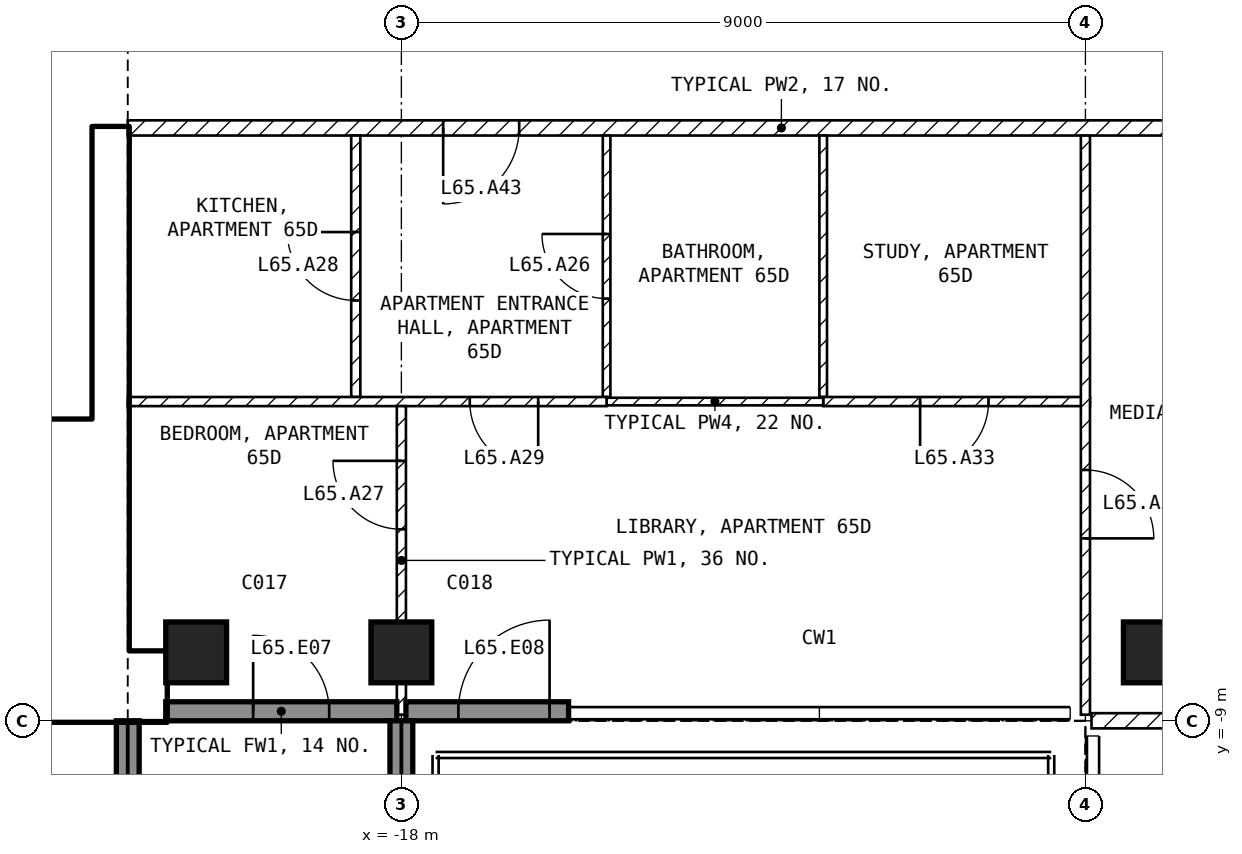
"""IFC4 building model, lengths in metres.
Left out: names, types, materials, properties, quantities, classifications, styles, units other than length and angle.
Written with IfcOpenShell. Run it as: python <this file> out.ifc"""

import sys

from ifc_helpers import new_model, si_unit, direction, frame, frame_2d, origin, origin_2d, place, context, subcontext, project, spatial, rectangle, extrude, element, fill, save


model = new_model("IFC4")
c1 = context("Model", 3, precision=1e-05, world=origin(), true_north=direction((0.0, 1.0)))
c2 = subcontext(c1, "Body", "Model", "MODEL_VIEW")
j1 = project(units=[si_unit("LENGTHUNIT", "METRE"), si_unit("PLANEANGLEUNIT", "RADIAN")], contexts=[c1])
p1 = place(None, origin())
s1 = spatial("IfcSite", under=j1, at=p1, CompositionType="ELEMENT")
p2 = place(p1, origin())
s2 = spatial("IfcBuilding", under=s1, at=p2, CompositionType="ELEMENT")
p3 = place(p2, frame((0.0, 0.0, 257.0)))
s3 = spatial("IfcBuildingStorey", under=s2, at=p3, CompositionType="ELEMENT", Elevation=257.0)
for number, where, z_axis, x_axis in (
    (1, (-20.7, -8.1, -0.25), (0.0, 0.0, 1.0), (1.0, 0.0, 0.0)),
    (2, (-18.0, -8.1, -0.25), (0.0, 0.0, 1.0), (1.0, 0.0, 0.0)),
    (3, (-8.1, -8.1, -0.25), (0.0, 0.0, 1.0), (1.0, 0.0, 0.0)),
):
    element("IfcColumn", number, at=place(p3, frame(where, z_axis=z_axis, x_axis=x_axis)), inside=s3, PredefinedType="COLUMN", context=c2, shape_type="SweptSolid", body=[
        extrude(rectangle(XDim=0.8, YDim=0.8, at=origin_2d()), origin(), (0.0, 0.0, 1.0), 3.5),
    ])
p4 = place(p3, frame((-21.1, -8.875, 0.0), z_axis=(0.0, 0.0, 1.0), x_axis=(1.0, 0.0, 0.0)))
e4 = element("IfcWall", 4, at=p4, inside=s3, PredefinedType="SOLIDWALL", context=c2, shape_type="SweptSolid", body=[
    extrude(rectangle(XDim=3.04, YDim=0.25, at=frame_2d((1.52, 0.0))), origin(), (0.0, 0.0, 1.0), 3.25),
])
p5 = place(p4, frame((1.15, 0.0, 0.0)))
e5 = element("IfcOpeningElement", 5, at=p5, cuts=e4, PredefinedType="OPENING", context=c2, shape_type="SweptSolid", body=[
    extrude(rectangle(XDim=1.0, YDim=2.4, at=frame_2d((0.5, 1.2))), frame((0.0, 0.135, 0.0), z_axis=(0.0, -1.0, 0.0), x_axis=(1.0, 0.0, 0.0)), (0.0, 0.0, 1.0), 0.27),
])
p6 = place(p3, frame((-17.94, -8.875, 0.0), z_axis=(0.0, 0.0, 1.0), x_axis=(1.0, 0.0, 0.0)))
e6 = element("IfcWall", 6, at=p6, inside=s3, PredefinedType="SOLIDWALL", context=c2, shape_type="SweptSolid", body=[
    extrude(rectangle(XDim=2.14, YDim=0.25, at=frame_2d((1.07, 0.0))), origin(), (0.0, 0.0, 1.0), 3.25),
])
p7 = place(p6, frame((0.69, 0.0, 0.0)))
e7 = element("IfcOpeningElement", 7, at=p7, cuts=e6, PredefinedType="OPENING", context=c2, shape_type="SweptSolid", body=[
    extrude(rectangle(XDim=1.2, YDim=2.4, at=frame_2d((0.6, 1.2))), frame((0.0, 0.135, 0.0), z_axis=(0.0, -1.0, 0.0), x_axis=(1.0, 0.0, 0.0)), (0.0, 0.0, 1.0), 0.27),
])
p8 = place(p3, frame((-21.6, -9.0, 0.0), z_axis=(0.0, 0.0, 1.0), x_axis=(0.0, -1.0, 0.0)))
e8 = element("IfcWall", 8, at=p8, inside=s3, PredefinedType="SOLIDWALL", context=c2, shape_type="SweptSolid", body=[
    extrude(rectangle(XDim=2.7, YDim=0.3, at=frame_2d((1.35, 0.0))), origin(), (0.0, 0.0, 1.0), 3.25),
])
p9 = place(p3, frame((-18.0, -9.0, 0.0), z_axis=(0.0, 0.0, 1.0), x_axis=(0.0, -1.0, 0.0)))
e9 = element("IfcWall", 9, at=p9, inside=s3, PredefinedType="SOLIDWALL", context=c2, shape_type="SweptSolid", body=[
    extrude(rectangle(XDim=2.74, YDim=0.3, at=frame_2d((1.37, 0.0))), origin(), (0.0, 0.0, 1.0), 3.25),
])
p10 = place(p3, frame((-30.2, -8.55, 0.0), z_axis=(0.0, 0.0, 1.0), x_axis=(1.0, 0.0, 0.0)))
e10 = element("IfcWall", 10, at=p10, inside=s3, PredefinedType="SHEAR", context=c2, shape_type="SweptSolid", body=[
    extrude(rectangle(XDim=9.1, YDim=0.9, at=frame_2d((4.55, 0.0))), origin(), (0.0, 0.0, 1.0), 3.25),
])
p11 = place(p3, frame((-21.825, -8.1, 0.0), z_axis=(0.0, 0.0, 1.0), x_axis=(0.0, 1.0, 0.0)))
e11 = element("IfcWall", 11, at=p11, inside=s3, PredefinedType="SHEAR", context=c2, shape_type="SweptSolid", body=[
    extrude(rectangle(XDim=6.9, YDim=0.45, at=frame_2d((3.45, 0.0))), origin(), (0.0, 0.0, 1.0), 3.25),
])
p12 = place(p3, frame((-28.35, -5.15, 0.0), z_axis=(0.0, 0.0, 1.0), x_axis=(1.0, 0.0, 0.0)))
e12 = element("IfcWall", 12, at=p12, inside=s3, PredefinedType="SOLIDWALL", context=c2, shape_type="SweptSolid", body=[
    extrude(rectangle(XDim=6.3, YDim=0.2, at=frame_2d((3.15, 0.0))), origin(), (0.0, 0.0, 1.0), 3.25),
])
p13 = place(p12, frame((5.1, 0.0, 0.0)))
e13 = element("IfcOpeningElement", 13, at=p13, cuts=e12, PredefinedType="OPENING", context=c2, shape_type="SweptSolid", body=[
    extrude(rectangle(XDim=1.0, YDim=2.1, at=frame_2d((0.5, 1.05))), frame((0.0, 0.11, 0.0), z_axis=(0.0, -1.0, 0.0), x_axis=(1.0, 0.0, 0.0)), (0.0, 0.0, 1.0), 0.22),
])
p14 = place(p3, frame((-4.4, -1.2, 0.0), z_axis=(0.0, 0.0, 1.0), x_axis=(-1.0, 0.0, 0.0)))
e14 = element("IfcWall", 14, at=p14, inside=s3, PredefinedType="PARTITIONING", context=c2, shape_type="SweptSolid", body=[
    extrude(rectangle(XDim=17.2, YDim=0.2, at=frame_2d((8.6, 0.0))), origin(), (0.0, 0.0, 1.0), 3.25),
])
p15 = place(p14, frame((12.05, 0.0, 0.0)))
e15 = element("IfcOpeningElement", 15, at=p15, cuts=e14, PredefinedType="OPENING", context=c2, shape_type="SweptSolid", body=[
    extrude(rectangle(XDim=1.0, YDim=2.1, at=frame_2d((0.5, 1.05))), frame((0.0, 0.11, 0.0), z_axis=(0.0, -1.0, 0.0), x_axis=(1.0, 0.0, 0.0)), (0.0, 0.0, 1.0), 0.22),
])
p16 = place(p3, frame((8.92, -9.0, 0.0), z_axis=(0.0, 0.0, 1.0), x_axis=(-1.0, 0.0, 0.0)))
e16 = element("IfcWall", 16, at=p16, inside=s3, PredefinedType="PARTITIONING", context=c2, shape_type="SweptSolid", body=[
    extrude(rectangle(XDim=17.84, YDim=0.2, at=frame_2d((8.92, 0.0))), origin(), (0.0, 0.0, 1.0), 3.25),
])
p17 = place(p16, frame((8.42, 0.0, 0.0)))
e17 = element("IfcOpeningElement", 17, at=p17, cuts=e16, PredefinedType="OPENING", context=c2, shape_type="SweptSolid", body=[
    extrude(rectangle(XDim=1.0, YDim=2.1, at=frame_2d((0.5, 1.05))), frame((0.0, 0.11, 0.0), z_axis=(0.0, -1.0, 0.0), x_axis=(1.0, 0.0, 0.0)), (0.0, 0.0, 1.0), 0.22),
])
p18 = place(p3, frame((-12.45, -4.74, 0.0), z_axis=(0.0, 0.0, 1.0), x_axis=(0.0, 1.0, 0.0)))
e18 = element("IfcWall", 18, at=p18, inside=s3, PredefinedType="PARTITIONING", context=c2, shape_type="SweptSolid", body=[
    extrude(rectangle(XDim=3.44, YDim=0.1, at=frame_2d((1.72, 0.0))), origin(), (0.0, 0.0, 1.0), 3.25),
])
p19 = place(p3, frame((-8.94, -4.8, 0.0), z_axis=(0.0, 0.0, 1.0), x_axis=(-1.0, 0.0, 0.0)))
e19 = element("IfcWall", 19, at=p19, inside=s3, PredefinedType="PARTITIONING", context=c2, shape_type="SweptSolid", body=[
    extrude(rectangle(XDim=3.51, YDim=0.12, at=frame_2d((1.755, 0.0))), origin(), (0.0, 0.0, 1.0), 3.25),
])
p20 = place(p19, frame((1.335, 0.0, 0.0)))
e20 = element("IfcOpeningElement", 20, at=p20, cuts=e19, PredefinedType="OPENING", context=c2, shape_type="SweptSolid", body=[
    extrude(rectangle(XDim=0.9, YDim=2.1, at=frame_2d((0.45, 1.05))), frame((0.0, 0.07, 0.0), z_axis=(0.0, -1.0, 0.0), x_axis=(1.0, 0.0, 0.0)), (0.0, 0.0, 1.0), 0.14),
])
p21 = place(p3, frame((-9.0, -1.3, 0.0), z_axis=(0.0, 0.0, 1.0), x_axis=(0.0, -1.0, 0.0)))
e21 = element("IfcWall", 21, at=p21, inside=s3, PredefinedType="PARTITIONING", context=c2, shape_type="SweptSolid", body=[
    extrude(rectangle(XDim=7.62, YDim=0.12, at=frame_2d((3.81, 0.0))), origin(), (0.0, 0.0, 1.0), 3.25),
])
p22 = place(p21, frame((4.4, 0.0, 0.0)))
e22 = element("IfcOpeningElement", 22, at=p22, cuts=e21, PredefinedType="OPENING", context=c2, shape_type="SweptSolid", body=[
    extrude(rectangle(XDim=0.9, YDim=2.1, at=frame_2d((0.45, 1.05))), frame((0.0, 0.07, 0.0), z_axis=(0.0, -1.0, 0.0), x_axis=(1.0, 0.0, 0.0)), (0.0, 0.0, 1.0), 0.14),
])
p23 = place(p3, frame((-15.3, -4.74, 0.0), z_axis=(0.0, 0.0, 1.0), x_axis=(0.0, 1.0, 0.0)))
e23 = element("IfcWall", 23, at=p23, inside=s3, PredefinedType="PARTITIONING", context=c2, shape_type="SweptSolid", body=[
    extrude(rectangle(XDim=3.44, YDim=0.1, at=frame_2d((1.72, 0.0))), origin(), (0.0, 0.0, 1.0), 3.25),
])
p24 = place(p23, frame((1.295, 0.0, 0.0)))
e24 = element("IfcOpeningElement", 24, at=p24, cuts=e23, PredefinedType="OPENING", context=c2, shape_type="SweptSolid", body=[
    extrude(rectangle(XDim=0.85, YDim=2.1, at=frame_2d((0.425, 1.05))), frame((0.0, 0.06, 0.0), z_axis=(0.0, -1.0, 0.0), x_axis=(1.0, 0.0, 0.0)), (0.0, 0.0, 1.0), 0.12),
])
p25 = place(p3, frame((-12.45, -4.8, 0.0), z_axis=(0.0, 0.0, 1.0), x_axis=(-1.0, 0.0, 0.0)))
e25 = element("IfcWall", 25, at=p25, inside=s3, PredefinedType="PARTITIONING", context=c2, shape_type="SweptSolid", body=[
    extrude(rectangle(XDim=2.85, YDim=0.1, at=frame_2d((1.425, 0.0))), origin(), (0.0, 0.0, 1.0), 3.25),
])
p26 = place(p3, frame((-18.6, -4.74, 0.0), z_axis=(0.0, 0.0, 1.0), x_axis=(0.0, 1.0, 0.0)))
e26 = element("IfcWall", 26, at=p26, inside=s3, PredefinedType="PARTITIONING", context=c2, shape_type="SweptSolid", body=[
    extrude(rectangle(XDim=3.44, YDim=0.12, at=frame_2d((1.72, 0.0))), origin(), (0.0, 0.0, 1.0), 3.25),
])
p27 = place(p26, frame((1.27, 0.0, 0.0)))
e27 = element("IfcOpeningElement", 27, at=p27, cuts=e26, PredefinedType="OPENING", context=c2, shape_type="SweptSolid", body=[
    extrude(rectangle(XDim=0.9, YDim=2.1, at=frame_2d((0.45, 1.05))), frame((0.0, 0.07, 0.0), z_axis=(0.0, -1.0, 0.0), x_axis=(1.0, 0.0, 0.0)), (0.0, 0.0, 1.0), 0.14),
])
p28 = place(p3, frame((-15.3, -4.8, 0.0), z_axis=(0.0, 0.0, 1.0), x_axis=(-1.0, 0.0, 0.0)))
e28 = element("IfcWall", 28, at=p28, inside=s3, PredefinedType="PARTITIONING", context=c2, shape_type="SweptSolid", body=[
    extrude(rectangle(XDim=6.3, YDim=0.12, at=frame_2d((3.15, 0.0))), origin(), (0.0, 0.0, 1.0), 3.25),
])
p29 = place(p28, frame((0.9, 0.0, 0.0)))
e29 = element("IfcOpeningElement", 29, at=p29, cuts=e28, PredefinedType="OPENING", context=c2, shape_type="SweptSolid", body=[
    extrude(rectangle(XDim=0.9, YDim=2.1, at=frame_2d((0.45, 1.05))), frame((0.0, 0.07, 0.0), z_axis=(0.0, -1.0, 0.0), x_axis=(1.0, 0.0, 0.0)), (0.0, 0.0, 1.0), 0.14),
])
p30 = place(p3, frame((-18.0, -8.92, 0.0), z_axis=(0.0, 0.0, 1.0), x_axis=(0.0, 1.0, 0.0)))
e30 = element("IfcWall", 30, at=p30, inside=s3, PredefinedType="PARTITIONING", context=c2, shape_type="SweptSolid", body=[
    extrude(rectangle(XDim=4.06, YDim=0.12, at=frame_2d((2.03, 0.0))), origin(), (0.0, 0.0, 1.0), 2.496),
])
p31 = place(p30, frame((2.44, 0.0, 0.0)))
e31 = element("IfcOpeningElement", 31, at=p31, cuts=e30, PredefinedType="OPENING", context=c2, shape_type="SweptSolid", body=[
    extrude(rectangle(XDim=0.9, YDim=2.1, at=frame_2d((0.45, 1.05))), frame((0.0, 0.07, 0.0), z_axis=(0.0, -1.0, 0.0), x_axis=(1.0, 0.0, 0.0)), (0.0, 0.0, 1.0), 0.14),
])
p32 = place(p5, origin())
e32 = element("IfcDoor", 32, at=p32, inside=s3, OperationType="SINGLE_SWING_LEFT", PredefinedType="DOOR", context=c2, shape_type="SweptSolid", body=[
    extrude(rectangle(XDim=1.0, YDim=2.4, at=frame_2d((0.5, 1.2))), frame((0.0, 0.025, 0.0), z_axis=(0.0, -1.0, 0.0), x_axis=(1.0, 0.0, 0.0)), (0.0, 0.0, 1.0), 0.05),
])
fill(e5, e32)
p33 = place(p7, origin())
e33 = element("IfcDoor", 33, at=p33, inside=s3, OperationType="SINGLE_SWING_RIGHT", PredefinedType="DOOR", context=c2, shape_type="SweptSolid", body=[
    extrude(rectangle(XDim=1.2, YDim=2.4, at=frame_2d((0.6, 1.2))), frame((0.0, 0.025, 0.0), z_axis=(0.0, -1.0, 0.0), x_axis=(1.0, 0.0, 0.0)), (0.0, 0.0, 1.0), 0.05),
])
fill(e7, e33)
p34 = place(p13, origin())
e34 = element("IfcDoor", 34, at=p34, inside=s3, OperationType="SINGLE_SWING_LEFT", PredefinedType="DOOR", context=c2, shape_type="SweptSolid", body=[
    extrude(rectangle(XDim=1.0, YDim=2.1, at=frame_2d((0.5, 1.05))), frame((0.0, 0.025, 0.0), z_axis=(0.0, -1.0, 0.0), x_axis=(1.0, 0.0, 0.0)), (0.0, 0.0, 1.0), 0.05),
])
fill(e13, e34)
p35 = place(p24, origin())
e35 = element("IfcDoor", 35, at=p35, inside=s3, OperationType="SINGLE_SWING_RIGHT", PredefinedType="DOOR", context=c2, shape_type="SweptSolid", body=[
    extrude(rectangle(XDim=0.85, YDim=2.1, at=frame_2d((0.425, 1.05))), frame((0.0, 0.025, 0.0), z_axis=(0.0, -1.0, 0.0), x_axis=(1.0, 0.0, 0.0)), (0.0, 0.0, 1.0), 0.05),
])
fill(e24, e35)
p36 = place(p31, origin())
e36 = element("IfcDoor", 36, at=p36, inside=s3, OperationType="SINGLE_SWING_RIGHT", PredefinedType="DOOR", context=c2, shape_type="SweptSolid", body=[
    extrude(rectangle(XDim=0.9, YDim=2.1, at=frame_2d((0.45, 1.05))), frame((0.0, 0.025, 0.0), z_axis=(0.0, -1.0, 0.0), x_axis=(1.0, 0.0, 0.0)), (0.0, 0.0, 1.0), 0.05),
])
fill(e31, e36)
p37 = place(p27, origin())
e37 = element("IfcDoor", 37, at=p37, inside=s3, OperationType="SINGLE_SWING_RIGHT", PredefinedType="DOOR", context=c2, shape_type="SweptSolid", body=[
    extrude(rectangle(XDim=0.9, YDim=2.1, at=frame_2d((0.45, 1.05))), frame((0.0, 0.025, 0.0), z_axis=(0.0, -1.0, 0.0), x_axis=(1.0, 0.0, 0.0)), (0.0, 0.0, 1.0), 0.05),
])
fill(e27, e37)
p38 = place(p29, origin())
e38 = element("IfcDoor", 38, at=p38, inside=s3, OperationType="SINGLE_SWING_LEFT", PredefinedType="DOOR", context=c2, shape_type="SweptSolid", body=[
    extrude(rectangle(XDim=0.9, YDim=2.1, at=frame_2d((0.45, 1.05))), frame((0.0, 0.025, 0.0), z_axis=(0.0, -1.0, 0.0), x_axis=(1.0, 0.0, 0.0)), (0.0, 0.0, 1.0), 0.05),
])
fill(e29, e38)
p39 = place(p22, origin())
e39 = element("IfcDoor", 39, at=p39, inside=s3, OperationType="SINGLE_SWING_RIGHT", PredefinedType="DOOR", context=c2, shape_type="SweptSolid", body=[
    extrude(rectangle(XDim=0.9, YDim=2.1, at=frame_2d((0.45, 1.05))), frame((0.0, 0.025, 0.0), z_axis=(0.0, -1.0, 0.0), x_axis=(1.0, 0.0, 0.0)), (0.0, 0.0, 1.0), 0.05),
])
fill(e22, e39)
p40 = place(p20, origin())
e40 = element("IfcDoor", 40, at=p40, inside=s3, OperationType="SINGLE_SWING_RIGHT", PredefinedType="DOOR", context=c2, shape_type="SweptSolid", body=[
    extrude(rectangle(XDim=0.9, YDim=2.1, at=frame_2d((0.45, 1.05))), frame((0.0, 0.025, 0.0), z_axis=(0.0, -1.0, 0.0), x_axis=(1.0, 0.0, 0.0)), (0.0, 0.0, 1.0), 0.05),
])
fill(e20, e40)
p41 = place(p15, origin())
e41 = element("IfcDoor", 41, at=p41, inside=s3, OperationType="SINGLE_SWING_RIGHT", PredefinedType="DOOR", context=c2, shape_type="SweptSolid", body=[
    extrude(rectangle(XDim=1.0, YDim=2.1, at=frame_2d((0.5, 1.05))), frame((0.0, 0.025, 0.0), z_axis=(0.0, -1.0, 0.0), x_axis=(1.0, 0.0, 0.0)), (0.0, 0.0, 1.0), 0.05),
])
fill(e15, e41)
save(model, sys.argv[1])
